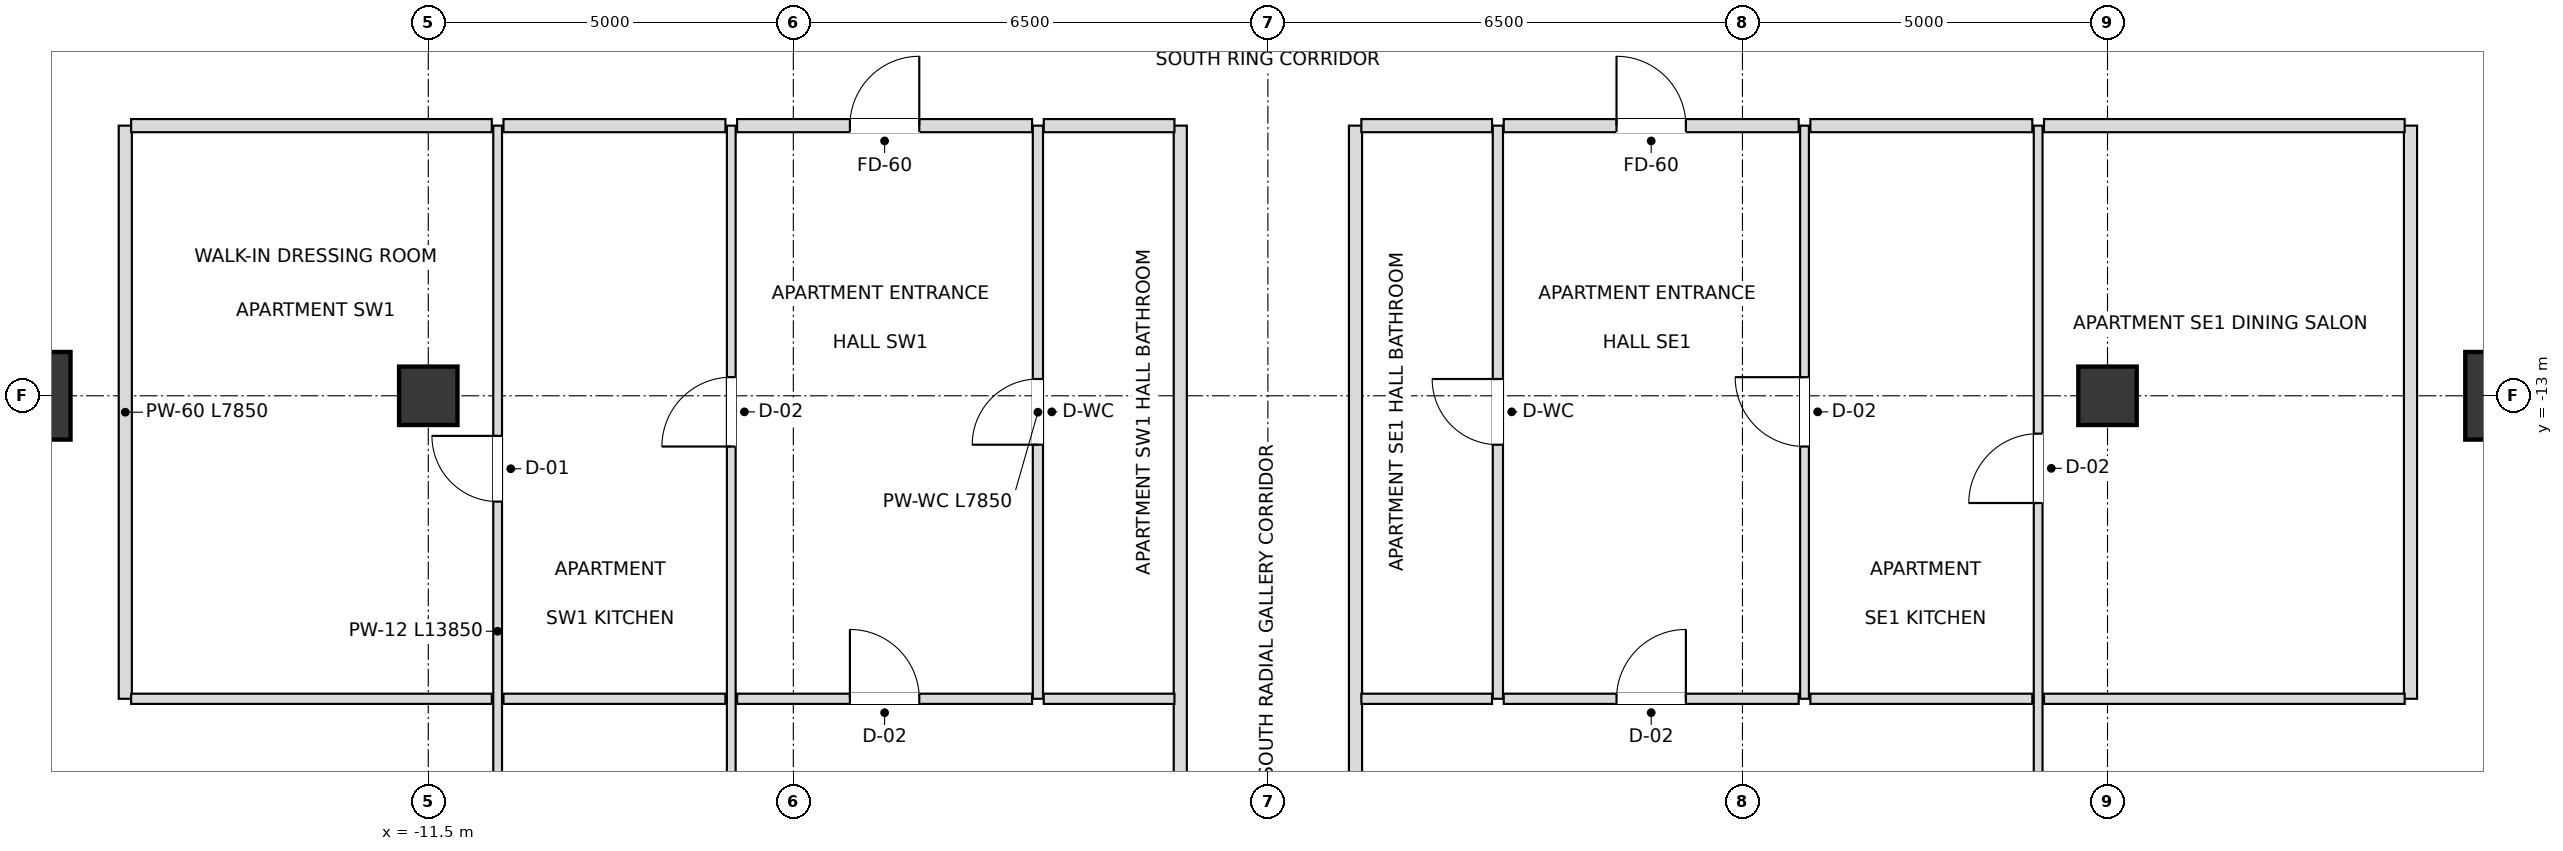
"""IFC4 building model, lengths in metres.
Left out: names, types, materials, properties, quantities, classifications, styles, units other than length and angle.
Written with IfcOpenShell. Run it as: python <this file> out.ifc"""

import sys

from ifc_helpers import new_model, si_unit, direction, frame, frame_2d, origin, origin_2d, place, context, subcontext, project, spatial, rectangle, extrude, element, fill, save


model = new_model("IFC4")
c1 = context("Model", 3, precision=1e-05, world=origin(), true_north=direction((0.0, 1.0)))
c2 = subcontext(c1, "Body", "Model", "MODEL_VIEW")
j1 = project(units=[si_unit("LENGTHUNIT", "METRE"), si_unit("PLANEANGLEUNIT", "RADIAN")], contexts=[c1])
p1 = place(None, origin())
s1 = spatial("IfcSite", under=j1, at=p1, CompositionType="ELEMENT")
p2 = place(p1, origin())
s2 = spatial("IfcBuilding", under=s1, at=p2, CompositionType="ELEMENT")
p3 = place(p2, frame((0.0, 0.0, 99.0)))
s3 = spatial("IfcBuildingStorey", under=s2, at=p3, CompositionType="ELEMENT", Elevation=99.0)
for number, where, z_axis, x_axis in (
    (1, (17.0, -13.0, 0.0), (0.0, 0.0, 1.0), (1.0, 0.0, 0.0)),
    (2, (-17.0, -13.0, 0.0), (0.0, 0.0, 1.0), (1.0, 0.0, 0.0)),
):
    element("IfcColumn", number, at=place(p3, frame(where, z_axis=z_axis, x_axis=x_axis)), inside=s3, PredefinedType="USERDEFINED", context=c2, shape_type="SweptSolid", body=[
        extrude(rectangle(XDim=1.2, YDim=1.2, at=origin_2d()), origin(), (0.0, 0.0, 1.0), 3.6),
    ])
for number, where, z_axis, x_axis in (
    (3, (-11.5, -13.0, 0.0), (0.0, 0.0, 1.0), (1.0, 0.0, 0.0)),
    (4, (11.5, -13.0, 0.0), (0.0, 0.0, 1.0), (1.0, 0.0, 0.0)),
):
    element("IfcColumn", number, at=place(p3, frame(where, z_axis=z_axis, x_axis=x_axis)), inside=s3, PredefinedType="COLUMN", context=c2, shape_type="SweptSolid", body=[
        extrude(rectangle(XDim=0.8, YDim=0.8, at=origin_2d()), origin(), (0.0, 0.0, 1.0), 3.6),
    ])
p4 = place(p3, frame((-15.65, -17.15, 0.0), z_axis=(0.0, 0.0, 1.0), x_axis=(0.0, 1.0, 0.0)))
e5 = element("IfcWall", 5, at=p4, inside=s3, PredefinedType="PARTITIONING", context=c2, shape_type="SweptSolid", body=[
    extrude(rectangle(XDim=7.85, YDim=0.18, at=frame_2d((3.925, 0.0))), origin(), (0.0, 0.0, 1.0), 2.736),
])
p5 = place(p3, frame((-10.55, -23.15, 0.0), z_axis=(0.0, 0.0, 1.0), x_axis=(0.0, 1.0, 0.0)))
e6 = element("IfcWall", 6, at=p5, inside=s3, PredefinedType="PARTITIONING", context=c2, shape_type="SweptSolid", body=[
    extrude(rectangle(XDim=13.85, YDim=0.12, at=frame_2d((6.925, 0.0))), origin(), (0.0, 0.0, 1.0), 2.816),
])
p6 = place(p5, frame((8.701, 0.0, 0.0)))
e7 = element("IfcOpeningElement", 7, at=p6, cuts=e6, PredefinedType="OPENING", context=c2, shape_type="SweptSolid", body=[
    extrude(rectangle(XDim=0.9, YDim=2.1, at=frame_2d((0.45, 1.05))), frame((0.0, 0.07, 0.0), z_axis=(0.0, -1.0, 0.0), x_axis=(1.0, 0.0, 0.0)), (0.0, 0.0, 1.0), 0.14),
])
p7 = place(p5, frame((1.399, 0.0, 0.0)))
e8 = element("IfcOpeningElement", 8, at=p7, cuts=e6, PredefinedType="OPENING", context=c2, shape_type="SweptSolid", body=[
    extrude(rectangle(XDim=0.9, YDim=2.1, at=frame_2d((0.45, 1.05))), frame((0.0, 0.07, 0.0), z_axis=(0.0, -1.0, 0.0), x_axis=(1.0, 0.0, 0.0)), (0.0, 0.0, 1.0), 0.14),
])
p8 = place(p3, frame((-7.35, -23.15, 0.0), z_axis=(0.0, 0.0, 1.0), x_axis=(0.0, 1.0, 0.0)))
e9 = element("IfcWall", 9, at=p8, inside=s3, PredefinedType="PARTITIONING", context=c2, shape_type="SweptSolid", body=[
    extrude(rectangle(XDim=13.85, YDim=0.12, at=frame_2d((6.925, 0.0))), origin(), (0.0, 0.0, 1.0), 2.816),
])
p9 = place(p8, frame((9.455, 0.0, 0.0)))
e10 = element("IfcOpeningElement", 10, at=p9, cuts=e9, PredefinedType="OPENING", context=c2, shape_type="SweptSolid", body=[
    extrude(rectangle(XDim=0.95, YDim=2.1, at=frame_2d((0.475, 1.05))), frame((0.0, 0.07, 0.0), z_axis=(0.0, -1.0, 0.0), x_axis=(1.0, 0.0, 0.0)), (0.0, 0.0, 1.0), 0.14),
])
p10 = place(p8, frame((1.399, 0.0, 0.0)))
e11 = element("IfcOpeningElement", 11, at=p10, cuts=e9, PredefinedType="OPENING", context=c2, shape_type="SweptSolid", body=[
    extrude(rectangle(XDim=0.9, YDim=2.1, at=frame_2d((0.45, 1.05))), frame((0.0, 0.07, 0.0), z_axis=(0.0, -1.0, 0.0), x_axis=(1.0, 0.0, 0.0)), (0.0, 0.0, 1.0), 0.14),
])
p11 = place(p3, frame((-3.15, -17.15, 0.0), z_axis=(0.0, 0.0, 1.0), x_axis=(0.0, 1.0, 0.0)))
e12 = element("IfcWall", 12, at=p11, inside=s3, PredefinedType="PARTITIONING", context=c2, shape_type="SweptSolid", body=[
    extrude(rectangle(XDim=7.85, YDim=0.14, at=frame_2d((3.925, 0.0))), origin(), (0.0, 0.0, 1.0), 3.38),
])
p12 = place(p11, frame((3.48, 0.0, 0.0)))
e13 = element("IfcOpeningElement", 13, at=p12, cuts=e12, PredefinedType="OPENING", context=c2, shape_type="SweptSolid", body=[
    extrude(rectangle(XDim=0.9, YDim=2.1, at=frame_2d((0.45, 1.05))), frame((0.0, 0.08, 0.0), z_axis=(0.0, -1.0, 0.0), x_axis=(1.0, 0.0, 0.0)), (0.0, 0.0, 1.0), 0.16),
])
for number, where, z_axis, x_axis in (
    (14, (-1.2, -23.15, 0.0), (0.0, 0.0, 1.0), (0.0, 1.0, 0.0)),
    (15, (1.2, -23.15, 0.0), (0.0, 0.0, 1.0), (0.0, 1.0, 0.0)),
):
    element("IfcWall", number, at=place(p3, frame(where, z_axis=z_axis, x_axis=x_axis)), inside=s3, PredefinedType="PARTITIONING", context=c2, shape_type="SweptSolid", body=[
        extrude(rectangle(XDim=13.85, YDim=0.18, at=frame_2d((6.925, 0.0))), origin(), (0.0, 0.0, 1.0), 2.816),
    ])
p13 = place(p3, frame((3.15, -17.15, 0.0), z_axis=(0.0, 0.0, 1.0), x_axis=(0.0, 1.0, 0.0)))
e16 = element("IfcWall", 16, at=p13, inside=s3, PredefinedType="PARTITIONING", context=c2, shape_type="SweptSolid", body=[
    extrude(rectangle(XDim=7.85, YDim=0.14, at=frame_2d((3.925, 0.0))), origin(), (0.0, 0.0, 1.0), 3.38),
])
p14 = place(p13, frame((3.48, 0.0, 0.0)))
e17 = element("IfcOpeningElement", 17, at=p14, cuts=e16, PredefinedType="OPENING", context=c2, shape_type="SweptSolid", body=[
    extrude(rectangle(XDim=0.9, YDim=2.1, at=frame_2d((0.45, 1.05))), frame((0.0, 0.08, 0.0), z_axis=(0.0, -1.0, 0.0), x_axis=(1.0, 0.0, 0.0)), (0.0, 0.0, 1.0), 0.16),
])
p15 = place(p3, frame((7.35, -17.15, 0.0), z_axis=(0.0, 0.0, 1.0), x_axis=(0.0, 1.0, 0.0)))
e18 = element("IfcWall", 18, at=p15, inside=s3, PredefinedType="PARTITIONING", context=c2, shape_type="SweptSolid", body=[
    extrude(rectangle(XDim=7.85, YDim=0.12, at=frame_2d((3.925, 0.0))), origin(), (0.0, 0.0, 1.0), 2.816),
])
p16 = place(p15, frame((3.455, 0.0, 0.0)))
e19 = element("IfcOpeningElement", 19, at=p16, cuts=e18, PredefinedType="OPENING", context=c2, shape_type="SweptSolid", body=[
    extrude(rectangle(XDim=0.95, YDim=2.1, at=frame_2d((0.475, 1.05))), frame((0.0, 0.07, 0.0), z_axis=(0.0, -1.0, 0.0), x_axis=(1.0, 0.0, 0.0)), (0.0, 0.0, 1.0), 0.14),
])
p17 = place(p3, frame((10.55, -23.15, 0.0), z_axis=(0.0, 0.0, 1.0), x_axis=(0.0, 1.0, 0.0)))
e20 = element("IfcWall", 20, at=p17, inside=s3, PredefinedType="PARTITIONING", context=c2, shape_type="SweptSolid", body=[
    extrude(rectangle(XDim=13.85, YDim=0.12, at=frame_2d((6.925, 0.0))), origin(), (0.0, 0.0, 1.0), 2.816),
])
p18 = place(p17, frame((8.681, 0.0, 0.0)))
e21 = element("IfcOpeningElement", 21, at=p18, cuts=e20, PredefinedType="OPENING", context=c2, shape_type="SweptSolid", body=[
    extrude(rectangle(XDim=0.95, YDim=2.1, at=frame_2d((0.475, 1.05))), frame((0.0, 0.07, 0.0), z_axis=(0.0, -1.0, 0.0), x_axis=(1.0, 0.0, 0.0)), (0.0, 0.0, 1.0), 0.14),
])
p19 = place(p17, frame((1.399, 0.0, 0.0)))
e22 = element("IfcOpeningElement", 22, at=p19, cuts=e20, PredefinedType="OPENING", context=c2, shape_type="SweptSolid", body=[
    extrude(rectangle(XDim=0.9, YDim=2.1, at=frame_2d((0.45, 1.05))), frame((0.0, 0.07, 0.0), z_axis=(0.0, -1.0, 0.0), x_axis=(1.0, 0.0, 0.0)), (0.0, 0.0, 1.0), 0.14),
])
p20 = place(p3, frame((15.65, -17.15, 0.0), z_axis=(0.0, 0.0, 1.0), x_axis=(0.0, 1.0, 0.0)))
e23 = element("IfcWall", 23, at=p20, inside=s3, PredefinedType="PARTITIONING", context=c2, shape_type="SweptSolid", body=[
    extrude(rectangle(XDim=7.85, YDim=0.18, at=frame_2d((3.925, 0.0))), origin(), (0.0, 0.0, 1.0), 2.736),
])
p21 = place(p3, frame((-15.57, -17.15, 0.0), z_axis=(0.0, 0.0, 1.0), x_axis=(1.0, 0.0, 0.0)))
e24 = element("IfcWall", 24, at=p21, inside=s3, PredefinedType="PARTITIONING", context=c2, shape_type="SweptSolid", body=[
    extrude(rectangle(XDim=4.94, YDim=0.14, at=frame_2d((2.47, 0.0))), origin(), (0.0, 0.0, 1.0), 2.736),
])
p22 = place(p3, frame((-10.47, -17.15, 0.0), z_axis=(0.0, 0.0, 1.0), x_axis=(1.0, 0.0, 0.0)))
e25 = element("IfcWall", 25, at=p22, inside=s3, PredefinedType="PARTITIONING", context=c2, shape_type="SweptSolid", body=[
    extrude(rectangle(XDim=3.04, YDim=0.14, at=frame_2d((1.52, 0.0))), origin(), (0.0, 0.0, 1.0), 3.38),
])
p23 = place(p3, frame((-7.27, -17.15, 0.0), z_axis=(0.0, 0.0, 1.0), x_axis=(1.0, 0.0, 0.0)))
e26 = element("IfcWall", 26, at=p23, inside=s3, PredefinedType="PARTITIONING", context=c2, shape_type="SweptSolid", body=[
    extrude(rectangle(XDim=4.04, YDim=0.14, at=frame_2d((2.02, 0.0))), origin(), (0.0, 0.0, 1.0), 2.816),
])
p24 = place(p23, frame((1.545, 0.0, 0.0)))
e27 = element("IfcOpeningElement", 27, at=p24, cuts=e26, PredefinedType="OPENING", context=c2, shape_type="SweptSolid", body=[
    extrude(rectangle(XDim=0.95, YDim=2.1, at=frame_2d((0.475, 1.05))), frame((0.0, 0.08, 0.0), z_axis=(0.0, -1.0, 0.0), x_axis=(1.0, 0.0, 0.0)), (0.0, 0.0, 1.0), 0.16),
])
for number, where, z_axis, x_axis in (
    (28, (-3.07, -17.15, 0.0), (0.0, 0.0, 1.0), (1.0, 0.0, 0.0)),
    (29, (1.28, -17.15, 0.0), (0.0, 0.0, 1.0), (1.0, 0.0, 0.0)),
):
    element("IfcWall", number, at=place(p3, frame(where, z_axis=z_axis, x_axis=x_axis)), inside=s3, PredefinedType="PARTITIONING", context=c2, shape_type="SweptSolid", body=[
        extrude(rectangle(XDim=1.79, YDim=0.14, at=frame_2d((0.895, 0.0))), origin(), (0.0, 0.0, 1.0), 3.38),
    ])
p25 = place(p3, frame((3.23, -17.15, 0.0), z_axis=(0.0, 0.0, 1.0), x_axis=(1.0, 0.0, 0.0)))
e30 = element("IfcWall", 30, at=p25, inside=s3, PredefinedType="PARTITIONING", context=c2, shape_type="SweptSolid", body=[
    extrude(rectangle(XDim=4.04, YDim=0.14, at=frame_2d((2.02, 0.0))), origin(), (0.0, 0.0, 1.0), 2.816),
])
p26 = place(p25, frame((1.545, 0.0, 0.0)))
e31 = element("IfcOpeningElement", 31, at=p26, cuts=e30, PredefinedType="OPENING", context=c2, shape_type="SweptSolid", body=[
    extrude(rectangle(XDim=0.95, YDim=2.1, at=frame_2d((0.475, 1.05))), frame((0.0, 0.08, 0.0), z_axis=(0.0, -1.0, 0.0), x_axis=(1.0, 0.0, 0.0)), (0.0, 0.0, 1.0), 0.16),
])
p27 = place(p3, frame((7.43, -17.15, 0.0), z_axis=(0.0, 0.0, 1.0), x_axis=(1.0, 0.0, 0.0)))
e32 = element("IfcWall", 32, at=p27, inside=s3, PredefinedType="PARTITIONING", context=c2, shape_type="SweptSolid", body=[
    extrude(rectangle(XDim=3.04, YDim=0.14, at=frame_2d((1.52, 0.0))), origin(), (0.0, 0.0, 1.0), 3.38),
])
p28 = place(p3, frame((10.63, -17.15, 0.0), z_axis=(0.0, 0.0, 1.0), x_axis=(1.0, 0.0, 0.0)))
e33 = element("IfcWall", 33, at=p28, inside=s3, PredefinedType="PARTITIONING", context=c2, shape_type="SweptSolid", body=[
    extrude(rectangle(XDim=4.94, YDim=0.14, at=frame_2d((2.47, 0.0))), origin(), (0.0, 0.0, 1.0), 2.736),
])
p29 = place(p3, frame((-15.57, -9.3, 0.0), z_axis=(0.0, 0.0, 1.0), x_axis=(1.0, 0.0, 0.0)))
e34 = element("IfcWall", 34, at=p29, inside=s3, PredefinedType="PARTITIONING", context=c2, shape_type="SweptSolid", body=[
    extrude(rectangle(XDim=4.94, YDim=0.18, at=frame_2d((2.47, 0.0))), origin(), (0.0, 0.0, 1.0), 3.38),
])
p30 = place(p3, frame((-10.47, -9.3, 0.0), z_axis=(0.0, 0.0, 1.0), x_axis=(1.0, 0.0, 0.0)))
e35 = element("IfcWall", 35, at=p30, inside=s3, PredefinedType="PARTITIONING", context=c2, shape_type="SweptSolid", body=[
    extrude(rectangle(XDim=3.04, YDim=0.18, at=frame_2d((1.52, 0.0))), origin(), (0.0, 0.0, 1.0), 3.38),
])
p31 = place(p3, frame((-7.27, -9.3, 0.0), z_axis=(0.0, 0.0, 1.0), x_axis=(1.0, 0.0, 0.0)))
e36 = element("IfcWall", 36, at=p31, inside=s3, PredefinedType="PARTITIONING", context=c2, shape_type="SweptSolid", body=[
    extrude(rectangle(XDim=4.04, YDim=0.18, at=frame_2d((2.02, 0.0))), origin(), (0.0, 0.0, 1.0), 2.816),
])
p32 = place(p31, frame((1.545, 0.0, 0.0)))
e37 = element("IfcOpeningElement", 37, at=p32, cuts=e36, PredefinedType="OPENING", context=c2, shape_type="SweptSolid", body=[
    extrude(rectangle(XDim=0.95, YDim=2.15, at=frame_2d((0.475, 1.075))), frame((0.0, 0.1, 0.0), z_axis=(0.0, -1.0, 0.0), x_axis=(1.0, 0.0, 0.0)), (0.0, 0.0, 1.0), 0.2),
])
for number, where, z_axis, x_axis in (
    (38, (-3.07, -9.3, 0.0), (0.0, 0.0, 1.0), (1.0, 0.0, 0.0)),
    (39, (1.28, -9.3, 0.0), (0.0, 0.0, 1.0), (1.0, 0.0, 0.0)),
):
    element("IfcWall", number, at=place(p3, frame(where, z_axis=z_axis, x_axis=x_axis)), inside=s3, PredefinedType="PARTITIONING", context=c2, shape_type="SweptSolid", body=[
        extrude(rectangle(XDim=1.79, YDim=0.18, at=frame_2d((0.895, 0.0))), origin(), (0.0, 0.0, 1.0), 3.38),
    ])
p33 = place(p3, frame((3.23, -9.3, 0.0), z_axis=(0.0, 0.0, 1.0), x_axis=(1.0, 0.0, 0.0)))
e40 = element("IfcWall", 40, at=p33, inside=s3, PredefinedType="PARTITIONING", context=c2, shape_type="SweptSolid", body=[
    extrude(rectangle(XDim=4.04, YDim=0.18, at=frame_2d((2.02, 0.0))), origin(), (0.0, 0.0, 1.0), 2.816),
])
p34 = place(p33, frame((1.545, 0.0, 0.0)))
e41 = element("IfcOpeningElement", 41, at=p34, cuts=e40, PredefinedType="OPENING", context=c2, shape_type="SweptSolid", body=[
    extrude(rectangle(XDim=0.95, YDim=2.15, at=frame_2d((0.475, 1.075))), frame((0.0, 0.1, 0.0), z_axis=(0.0, -1.0, 0.0), x_axis=(1.0, 0.0, 0.0)), (0.0, 0.0, 1.0), 0.2),
])
p35 = place(p3, frame((7.43, -9.3, 0.0), z_axis=(0.0, 0.0, 1.0), x_axis=(1.0, 0.0, 0.0)))
e42 = element("IfcWall", 42, at=p35, inside=s3, PredefinedType="PARTITIONING", context=c2, shape_type="SweptSolid", body=[
    extrude(rectangle(XDim=3.04, YDim=0.18, at=frame_2d((1.52, 0.0))), origin(), (0.0, 0.0, 1.0), 3.38),
])
p36 = place(p3, frame((10.63, -9.3, 0.0), z_axis=(0.0, 0.0, 1.0), x_axis=(1.0, 0.0, 0.0)))
e43 = element("IfcWall", 43, at=p36, inside=s3, PredefinedType="PARTITIONING", context=c2, shape_type="SweptSolid", body=[
    extrude(rectangle(XDim=4.94, YDim=0.18, at=frame_2d((2.47, 0.0))), origin(), (0.0, 0.0, 1.0), 3.38),
])
p37 = place(p12, origin())
e44 = element("IfcDoor", 44, at=p37, inside=s3, OperationType="SINGLE_SWING_LEFT", PredefinedType="DOOR", context=c2, shape_type="SweptSolid", body=[
    extrude(rectangle(XDim=0.9, YDim=2.1, at=frame_2d((0.45, 1.05))), frame((0.0, 0.025, 0.0), z_axis=(0.0, -1.0, 0.0), x_axis=(1.0, 0.0, 0.0)), (0.0, 0.0, 1.0), 0.05),
])
fill(e13, e44)
p38 = place(p32, origin())
e45 = element("IfcDoor", 45, at=p38, inside=s3, OperationType="SINGLE_SWING_RIGHT", PredefinedType="DOOR", context=c2, shape_type="SweptSolid", body=[
    extrude(rectangle(XDim=0.95, YDim=2.15, at=frame_2d((0.475, 1.075))), frame((0.0, 0.025, 0.0), z_axis=(0.0, -1.0, 0.0), x_axis=(1.0, 0.0, 0.0)), (0.0, 0.0, 1.0), 0.05),
])
fill(e37, e45)
p39 = place(p9, origin())
e46 = element("IfcDoor", 46, at=p39, inside=s3, OperationType="SINGLE_SWING_LEFT", PredefinedType="DOOR", context=c2, shape_type="SweptSolid", body=[
    extrude(rectangle(XDim=0.95, YDim=2.1, at=frame_2d((0.475, 1.05))), frame((0.0, 0.025, 0.0), z_axis=(0.0, -1.0, 0.0), x_axis=(1.0, 0.0, 0.0)), (0.0, 0.0, 1.0), 0.05),
])
fill(e10, e46)
p40 = place(p6, origin())
e47 = element("IfcDoor", 47, at=p40, inside=s3, OperationType="SINGLE_SWING_RIGHT", PredefinedType="DOOR", context=c2, shape_type="SweptSolid", body=[
    extrude(rectangle(XDim=0.9, YDim=2.1, at=frame_2d((0.45, 1.05))), frame((0.0, 0.025, 0.0), z_axis=(0.0, -1.0, 0.0), x_axis=(1.0, 0.0, 0.0)), (0.0, 0.0, 1.0), 0.05),
])
fill(e7, e47)
p41 = place(p24, origin())
e48 = element("IfcDoor", 48, at=p41, inside=s3, OperationType="SINGLE_SWING_LEFT", PredefinedType="DOOR", context=c2, shape_type="SweptSolid", body=[
    extrude(rectangle(XDim=0.95, YDim=2.1, at=frame_2d((0.475, 1.05))), frame((0.0, 0.025, 0.0), z_axis=(0.0, -1.0, 0.0), x_axis=(1.0, 0.0, 0.0)), (0.0, 0.0, 1.0), 0.05),
])
fill(e27, e48)
p42 = place(p14, origin())
e49 = element("IfcDoor", 49, at=p42, inside=s3, OperationType="SINGLE_SWING_RIGHT", PredefinedType="DOOR", context=c2, shape_type="SweptSolid", body=[
    extrude(rectangle(XDim=0.9, YDim=2.1, at=frame_2d((0.45, 1.05))), frame((0.0, 0.025, 0.0), z_axis=(0.0, -1.0, 0.0), x_axis=(1.0, 0.0, 0.0)), (0.0, 0.0, 1.0), 0.05),
])
fill(e17, e49)
p43 = place(p34, origin())
e50 = element("IfcDoor", 50, at=p43, inside=s3, OperationType="SINGLE_SWING_LEFT", PredefinedType="DOOR", context=c2, shape_type="SweptSolid", body=[
    extrude(rectangle(XDim=0.95, YDim=2.15, at=frame_2d((0.475, 1.075))), frame((0.0, 0.025, 0.0), z_axis=(0.0, -1.0, 0.0), x_axis=(1.0, 0.0, 0.0)), (0.0, 0.0, 1.0), 0.05),
])
fill(e41, e50)
p44 = place(p16, origin())
e51 = element("IfcDoor", 51, at=p44, inside=s3, OperationType="SINGLE_SWING_RIGHT", PredefinedType="DOOR", context=c2, shape_type="SweptSolid", body=[
    extrude(rectangle(XDim=0.95, YDim=2.1, at=frame_2d((0.475, 1.05))), frame((0.0, 0.025, 0.0), z_axis=(0.0, -1.0, 0.0), x_axis=(1.0, 0.0, 0.0)), (0.0, 0.0, 1.0), 0.05),
])
fill(e19, e51)
p45 = place(p18, origin())
e52 = element("IfcDoor", 52, at=p45, inside=s3, OperationType="SINGLE_SWING_LEFT", PredefinedType="DOOR", context=c2, shape_type="SweptSolid", body=[
    extrude(rectangle(XDim=0.95, YDim=2.1, at=frame_2d((0.475, 1.05))), frame((0.0, 0.025, 0.0), z_axis=(0.0, -1.0, 0.0), x_axis=(1.0, 0.0, 0.0)), (0.0, 0.0, 1.0), 0.05),
])
fill(e21, e52)
p46 = place(p26, origin())
e53 = element("IfcDoor", 53, at=p46, inside=s3, OperationType="SINGLE_SWING_RIGHT", PredefinedType="DOOR", context=c2, shape_type="SweptSolid", body=[
    extrude(rectangle(XDim=0.95, YDim=2.1, at=frame_2d((0.475, 1.05))), frame((0.0, 0.025, 0.0), z_axis=(0.0, -1.0, 0.0), x_axis=(1.0, 0.0, 0.0)), (0.0, 0.0, 1.0), 0.05),
])
fill(e31, e53)
save(model, sys.argv[1])
